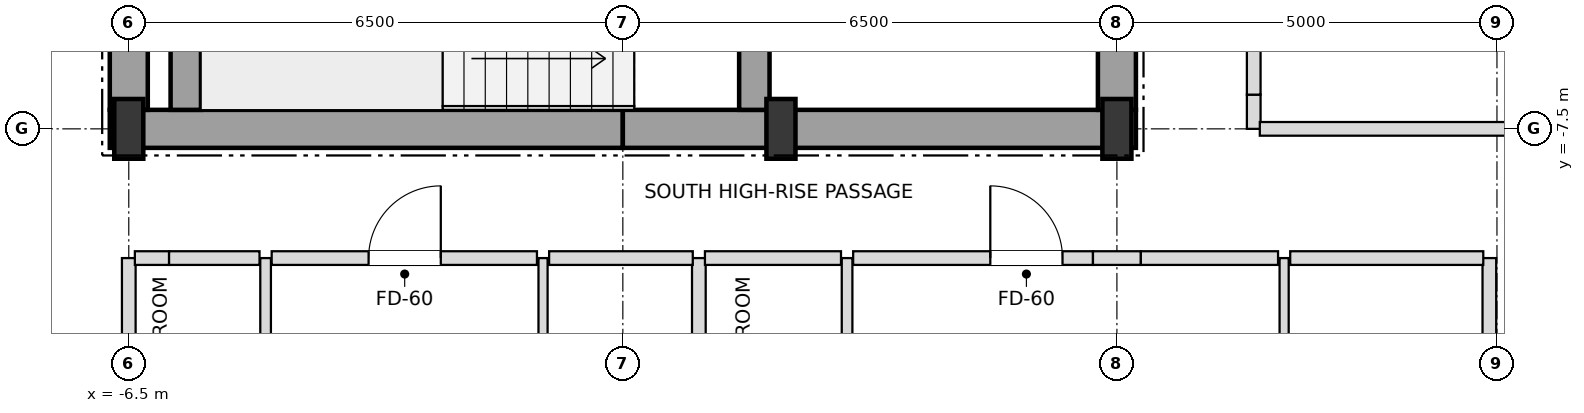
"""IFC4 building model, lengths in metres.
Left out: names, types, materials, properties, quantities, classifications, styles, units other than length and angle.
Written with IfcOpenShell. Run it as: python <this file> out.ifc"""

import sys

from ifc_helpers import new_model, si_unit, direction, frame, frame_2d, origin, origin_2d, place, context, subcontext, project, spatial, rectangle, i_section, extrude, element, fill, save


model = new_model("IFC4")
c1 = context("Model", 3, precision=1e-05, world=origin(), true_north=direction((0.0, 1.0)))
c2 = subcontext(c1, "Body", "Model", "MODEL_VIEW")
j1 = project(units=[si_unit("LENGTHUNIT", "METRE"), si_unit("PLANEANGLEUNIT", "RADIAN")], contexts=[c1])
p1 = place(None, origin())
s1 = spatial("IfcSite", under=j1, at=p1, CompositionType="ELEMENT")
p2 = place(p1, origin())
s2 = spatial("IfcBuilding", under=s1, at=p2, CompositionType="ELEMENT")
p3 = place(p2, frame((0.0, 0.0, 301.5)))
s3 = spatial("IfcBuildingStorey", under=s2, at=p3, CompositionType="ELEMENT", Elevation=301.5)
for number, where, z_axis, x_axis in (
    (1, (-6.5, -7.5, 0.0), (0.0, 0.0, 1.0), (1.0, 0.0, 0.0)),
    (2, (2.08, -7.5, 0.0), (0.0, 0.0, 1.0), (1.0, 0.0, 0.0)),
    (3, (6.5, -7.5, 0.0), (0.0, 0.0, 1.0), (1.0, 0.0, 0.0)),
):
    element("IfcColumn", number, at=place(p3, frame(where, z_axis=z_axis, x_axis=x_axis)), inside=s3, PredefinedType="COLUMN", context=c2, shape_type="SweptSolid", body=[
        extrude(i_section(OverallWidth=0.382, OverallDepth=0.786, WebThickness=0.02, FlangeThickness=0.033, at=origin_2d()), origin(), (0.0, 0.0, 1.0), 3.6),
    ])
for number, where, z_axis, x_axis in (
    (4, (-6.75, -7.5, 0.0), (0.0, 0.0, 1.0), (1.0, 0.0, 0.0)),
    (5, (0.0, -7.5, 0.0), (0.0, 0.0, 1.0), (1.0, 0.0, 0.0)),
):
    element("IfcWall", number, at=place(p3, frame(where, z_axis=z_axis, x_axis=x_axis)), inside=s3, PredefinedType="SHEAR", context=c2, shape_type="SweptSolid", body=[
        extrude(rectangle(XDim=6.75, YDim=0.5, at=frame_2d((3.375, 0.0))), origin(), (0.0, 0.0, 1.0), 3.3),
    ])
p4 = place(p3, frame((-6.5, -7.25, 0.0), z_axis=(0.0, 0.0, 1.0), x_axis=(0.0, 1.0, 0.0)))
e6 = element("IfcWall", 6, at=p4, inside=s3, PredefinedType="SHEAR", context=c2, shape_type="SweptSolid", body=[
    extrude(rectangle(XDim=3.55, YDim=0.5, at=frame_2d((1.775, 0.0))), origin(), (0.0, 0.0, 1.0), 3.3),
])
p5 = place(p3, frame((6.5, -7.25, 0.0), z_axis=(0.0, 0.0, 1.0), x_axis=(0.0, 1.0, 0.0)))
e7 = element("IfcWall", 7, at=p5, inside=s3, PredefinedType="SHEAR", context=c2, shape_type="SweptSolid", body=[
    extrude(rectangle(XDim=5.75, YDim=0.5, at=frame_2d((2.875, 0.0))), origin(), (0.0, 0.0, 1.0), 3.3),
])
p6 = place(p5, frame((0.85, 0.0, 0.0)))
e8 = element("IfcOpeningElement", 8, at=p6, cuts=e7, PredefinedType="OPENING", context=c2, shape_type="SweptSolid", body=[
    extrude(rectangle(XDim=1.05, YDim=2.15, at=frame_2d((0.525, 1.075))), frame((0.0, 0.26, 0.0), z_axis=(0.0, -1.0, 0.0), x_axis=(1.0, 0.0, 0.0)), (0.0, 0.0, 1.0), 0.52),
])
p7 = place(p3, frame((-5.75, -7.25, 0.0), z_axis=(0.0, 0.0, 1.0), x_axis=(0.0, 1.0, 0.0)))
e9 = element("IfcWall", 9, at=p7, inside=s3, PredefinedType="SHEAR", context=c2, shape_type="SweptSolid", body=[
    extrude(rectangle(XDim=2.9, YDim=0.4, at=frame_2d((1.45, 0.0))), origin(), (0.0, 0.0, 1.0), 3.3),
])
p8 = place(p3, frame((1.73, -7.25, 0.0), z_axis=(0.0, 0.0, 1.0), x_axis=(0.0, 1.0, 0.0)))
e10 = element("IfcWall", 10, at=p8, inside=s3, PredefinedType="SHEAR", context=c2, shape_type="SweptSolid", body=[
    extrude(rectangle(XDim=3.3, YDim=0.4, at=frame_2d((1.65, 0.0))), origin(), (0.0, 0.0, 1.0), 3.3),
])
p9 = place(p8, frame((0.9, 0.0, 0.0)))
e11 = element("IfcOpeningElement", 11, at=p9, cuts=e10, PredefinedType="OPENING", context=c2, shape_type="SweptSolid", body=[
    extrude(rectangle(XDim=1.05, YDim=2.15, at=frame_2d((0.525, 1.075))), frame((0.0, 0.21, 0.0), z_axis=(0.0, -1.0, 0.0), x_axis=(1.0, 0.0, 0.0)), (0.0, 0.0, 1.0), 0.42),
])
p10 = place(p3, frame((-6.5, -19.9, 0.0), z_axis=(0.0, 0.0, 1.0), x_axis=(0.0, 1.0, 0.0)))
e12 = element("IfcWall", 12, at=p10, inside=s3, PredefinedType="PARTITIONING", context=c2, shape_type="SweptSolid", body=[
    extrude(rectangle(XDim=10.7, YDim=0.18, at=frame_2d((5.35, 0.0))), origin(), (0.0, 0.0, 1.0), 1.485),
])
p11 = place(p3, frame((-4.7, -13.9, 0.0), z_axis=(0.0, 0.0, 1.0), x_axis=(0.0, 1.0, 0.0)))
e13 = element("IfcWall", 13, at=p11, inside=s3, PredefinedType="PARTITIONING", context=c2, shape_type="SweptSolid", body=[
    extrude(rectangle(XDim=4.7, YDim=0.14, at=frame_2d((2.35, 0.0))), origin(), (0.0, 0.0, 1.0), 3.3),
])
p12 = place(p11, frame((1.9, 0.0, 0.0)))
e14 = element("IfcOpeningElement", 14, at=p12, cuts=e13, PredefinedType="OPENING", context=c2, shape_type="SweptSolid", body=[
    extrude(rectangle(XDim=0.9, YDim=2.1, at=frame_2d((0.45, 1.05))), frame((0.0, 0.08, 0.0), z_axis=(0.0, -1.0, 0.0), x_axis=(1.0, 0.0, 0.0)), (0.0, 0.0, 1.0), 0.16),
])
p13 = place(p3, frame((-1.05, -13.9, 0.0), z_axis=(0.0, 0.0, 1.0), x_axis=(0.0, 1.0, 0.0)))
e15 = element("IfcWall", 15, at=p13, inside=s3, PredefinedType="PARTITIONING", context=c2, shape_type="SweptSolid", body=[
    extrude(rectangle(XDim=4.7, YDim=0.12, at=frame_2d((2.35, 0.0))), origin(), (0.0, 0.0, 1.0), 3.3),
])
p14 = place(p13, frame((1.875, 0.0, 0.0)))
e16 = element("IfcOpeningElement", 16, at=p14, cuts=e15, PredefinedType="OPENING", context=c2, shape_type="SweptSolid", body=[
    extrude(rectangle(XDim=0.95, YDim=2.1, at=frame_2d((0.475, 1.05))), frame((0.0, 0.07, 0.0), z_axis=(0.0, -1.0, 0.0), x_axis=(1.0, 0.0, 0.0)), (0.0, 0.0, 1.0), 0.14),
])
p15 = place(p3, frame((1.0, -19.9, 0.0), z_axis=(0.0, 0.0, 1.0), x_axis=(0.0, 1.0, 0.0)))
e17 = element("IfcWall", 17, at=p15, inside=s3, PredefinedType="PARTITIONING", context=c2, shape_type="SweptSolid", body=[
    extrude(rectangle(XDim=10.7, YDim=0.18, at=frame_2d((5.35, 0.0))), origin(), (0.0, 0.0, 1.0), 3.3),
])
p16 = place(p3, frame((2.95, -13.9, 0.0), z_axis=(0.0, 0.0, 1.0), x_axis=(0.0, 1.0, 0.0)))
e18 = element("IfcWall", 18, at=p16, inside=s3, PredefinedType="PARTITIONING", context=c2, shape_type="SweptSolid", body=[
    extrude(rectangle(XDim=4.7, YDim=0.14, at=frame_2d((2.35, 0.0))), origin(), (0.0, 0.0, 1.0), 3.3),
])
p17 = place(p16, frame((1.9, 0.0, 0.0)))
e19 = element("IfcOpeningElement", 19, at=p17, cuts=e18, PredefinedType="OPENING", context=c2, shape_type="SweptSolid", body=[
    extrude(rectangle(XDim=0.9, YDim=2.1, at=frame_2d((0.45, 1.05))), frame((0.0, 0.08, 0.0), z_axis=(0.0, -1.0, 0.0), x_axis=(1.0, 0.0, 0.0)), (0.0, 0.0, 1.0), 0.16),
])
p18 = place(p3, frame((8.3, -7.5, 0.0), z_axis=(0.0, 0.0, 1.0), x_axis=(0.0, 1.0, 0.0)))
e20 = element("IfcWall", 20, at=p18, inside=s3, PredefinedType="PARTITIONING", context=c2, shape_type="SweptSolid", body=[
    extrude(rectangle(XDim=0.45, YDim=0.18, at=frame_2d((0.225, 0.0))), origin(), (0.0, 0.0, 1.0), 1.485),
])
p19 = place(p3, frame((8.3, -7.05, 0.0), z_axis=(0.0, 0.0, 1.0), x_axis=(0.0, 1.0, 0.0)))
e21 = element("IfcWall", 21, at=p19, inside=s3, PredefinedType="PARTITIONING", context=c2, shape_type="SweptSolid", body=[
    extrude(rectangle(XDim=5.55, YDim=0.18, at=frame_2d((2.775, 0.0))), origin(), (0.0, 0.0, 1.0), 3.3),
])
p20 = place(p19, frame((0.975, 0.0, 0.0)))
e22 = element("IfcOpeningElement", 22, at=p20, cuts=e21, PredefinedType="OPENING", context=c2, shape_type="SweptSolid", body=[
    extrude(rectangle(XDim=0.95, YDim=2.15, at=frame_2d((0.475, 1.075))), frame((0.0, 0.1, 0.0), z_axis=(0.0, -1.0, 0.0), x_axis=(1.0, 0.0, 0.0)), (0.0, 0.0, 1.0), 0.2),
])
p21 = place(p3, frame((8.7, -19.9, 0.0), z_axis=(0.0, 0.0, 1.0), x_axis=(0.0, 1.0, 0.0)))
e23 = element("IfcWall", 23, at=p21, inside=s3, PredefinedType="PARTITIONING", context=c2, shape_type="SweptSolid", body=[
    extrude(rectangle(XDim=10.7, YDim=0.12, at=frame_2d((5.35, 0.0))), origin(), (0.0, 0.0, 1.0), 2.353),
])
p22 = place(p21, frame((7.875, 0.0, 0.0)))
e24 = element("IfcOpeningElement", 24, at=p22, cuts=e23, PredefinedType="OPENING", context=c2, shape_type="SweptSolid", body=[
    extrude(rectangle(XDim=0.95, YDim=2.1, at=frame_2d((0.475, 1.05))), frame((0.0, 0.07, 0.0), z_axis=(0.0, -1.0, 0.0), x_axis=(1.0, 0.0, 0.0)), (0.0, 0.0, 1.0), 0.14),
])
p23 = place(p21, frame((2.55, 0.0, 0.0)))
e25 = element("IfcOpeningElement", 25, at=p23, cuts=e23, PredefinedType="OPENING", context=c2, shape_type="SweptSolid", body=[
    extrude(rectangle(XDim=0.9, YDim=2.1, at=frame_2d((0.45, 1.05))), frame((0.0, 0.07, 0.0), z_axis=(0.0, -1.0, 0.0), x_axis=(1.0, 0.0, 0.0)), (0.0, 0.0, 1.0), 0.14),
])
p24 = place(p3, frame((11.4, -14.27, 0.0), z_axis=(0.0, 0.0, 1.0), x_axis=(0.0, 1.0, 0.0)))
e26 = element("IfcWall", 26, at=p24, inside=s3, PredefinedType="PARTITIONING", context=c2, shape_type="SweptSolid", body=[
    extrude(rectangle(XDim=5.07, YDim=0.18, at=frame_2d((2.535, 0.0))), origin(), (0.0, 0.0, 1.0), 2.353),
])
p25 = place(p3, frame((-6.42, -9.2, 0.0), z_axis=(0.0, 0.0, 1.0), x_axis=(1.0, 0.0, 0.0)))
e27 = element("IfcWall", 27, at=p25, inside=s3, PredefinedType="PARTITIONING", context=c2, shape_type="SweptSolid", body=[
    extrude(rectangle(XDim=0.45, YDim=0.18, at=frame_2d((0.225, 0.0))), origin(), (0.0, 0.0, 1.0), 1.485),
])
p26 = place(p3, frame((-5.97, -9.2, 0.0), z_axis=(0.0, 0.0, 1.0), x_axis=(1.0, 0.0, 0.0)))
e28 = element("IfcWall", 28, at=p26, inside=s3, PredefinedType="PARTITIONING", context=c2, shape_type="SweptSolid", body=[
    extrude(rectangle(XDim=1.19, YDim=0.18, at=frame_2d((0.595, 0.0))), origin(), (0.0, 0.0, 1.0), 3.3),
])
p27 = place(p3, frame((-4.62, -9.2, 0.0), z_axis=(0.0, 0.0, 1.0), x_axis=(1.0, 0.0, 0.0)))
e29 = element("IfcWall", 29, at=p27, inside=s3, PredefinedType="PARTITIONING", context=c2, shape_type="SweptSolid", body=[
    extrude(rectangle(XDim=3.49, YDim=0.18, at=frame_2d((1.745, 0.0))), origin(), (0.0, 0.0, 1.0), 3.3),
])
p28 = place(p27, frame((1.275, 0.0, 0.0)))
e30 = element("IfcOpeningElement", 30, at=p28, cuts=e29, PredefinedType="OPENING", context=c2, shape_type="SweptSolid", body=[
    extrude(rectangle(XDim=0.95, YDim=2.15, at=frame_2d((0.475, 1.075))), frame((0.0, 0.1, 0.0), z_axis=(0.0, -1.0, 0.0), x_axis=(1.0, 0.0, 0.0)), (0.0, 0.0, 1.0), 0.2),
])
p29 = place(p3, frame((-0.97, -9.2, 0.0), z_axis=(0.0, 0.0, 1.0), x_axis=(1.0, 0.0, 0.0)))
e31 = element("IfcWall", 31, at=p29, inside=s3, PredefinedType="PARTITIONING", context=c2, shape_type="SweptSolid", body=[
    extrude(rectangle(XDim=1.89, YDim=0.18, at=frame_2d((0.945, 0.0))), origin(), (0.0, 0.0, 1.0), 3.3),
])
p30 = place(p3, frame((1.08, -9.2, 0.0), z_axis=(0.0, 0.0, 1.0), x_axis=(1.0, 0.0, 0.0)))
e32 = element("IfcWall", 32, at=p30, inside=s3, PredefinedType="PARTITIONING", context=c2, shape_type="SweptSolid", body=[
    extrude(rectangle(XDim=1.79, YDim=0.18, at=frame_2d((0.895, 0.0))), origin(), (0.0, 0.0, 1.0), 3.3),
])
p31 = place(p3, frame((3.03, -9.2, 0.0), z_axis=(0.0, 0.0, 1.0), x_axis=(1.0, 0.0, 0.0)))
e33 = element("IfcWall", 33, at=p31, inside=s3, PredefinedType="PARTITIONING", context=c2, shape_type="SweptSolid", body=[
    extrude(rectangle(XDim=3.155, YDim=0.18, at=frame_2d((1.578, 0.0))), origin(), (0.0, 0.0, 1.0), 3.3),
])
p32 = place(p31, frame((1.804, 0.0, 0.0)))
e34 = element("IfcOpeningElement", 34, at=p32, cuts=e33, PredefinedType="OPENING", context=c2, shape_type="SweptSolid", body=[
    extrude(rectangle(XDim=0.95, YDim=2.15, at=frame_2d((0.475, 1.075))), frame((0.0, 0.1, 0.0), z_axis=(0.0, -1.0, 0.0), x_axis=(1.0, 0.0, 0.0)), (0.0, 0.0, 1.0), 0.2),
])
p33 = place(p3, frame((6.185, -9.2, 0.0), z_axis=(0.0, 0.0, 1.0), x_axis=(1.0, 0.0, 0.0)))
e35 = element("IfcWall", 35, at=p33, inside=s3, PredefinedType="PARTITIONING", context=c2, shape_type="SweptSolid", body=[
    extrude(rectangle(XDim=0.63, YDim=0.18, at=frame_2d((0.315, 0.0))), origin(), (0.0, 0.0, 1.0), 1.485),
])
p34 = place(p3, frame((6.815, -9.2, 0.0), z_axis=(0.0, 0.0, 1.0), x_axis=(1.0, 0.0, 0.0)))
e36 = element("IfcWall", 36, at=p34, inside=s3, PredefinedType="PARTITIONING", context=c2, shape_type="SweptSolid", body=[
    extrude(rectangle(XDim=1.805, YDim=0.18, at=frame_2d((0.903, 0.0))), origin(), (0.0, 0.0, 1.0), 3.3),
])
p35 = place(p3, frame((8.78, -9.2, 0.0), z_axis=(0.0, 0.0, 1.0), x_axis=(1.0, 0.0, 0.0)))
e37 = element("IfcWall", 37, at=p35, inside=s3, PredefinedType="PARTITIONING", context=c2, shape_type="SweptSolid", body=[
    extrude(rectangle(XDim=2.54, YDim=0.18, at=frame_2d((1.27, 0.0))), origin(), (0.0, 0.0, 1.0), 3.3),
])
p36 = place(p3, frame((8.38, -7.5, 0.0), z_axis=(0.0, 0.0, 1.0), x_axis=(1.0, 0.0, 0.0)))
e38 = element("IfcWall", 38, at=p36, inside=s3, PredefinedType="PARTITIONING", context=c2, shape_type="SweptSolid", body=[
    extrude(rectangle(XDim=8.52, YDim=0.18, at=frame_2d((4.26, 0.0))), origin(), (0.0, 0.0, 1.0), 1.485),
])
p37 = place(p28, origin())
e39 = element("IfcDoor", 39, at=p37, inside=s3, OperationType="SINGLE_SWING_RIGHT", PredefinedType="DOOR", context=c2, shape_type="SweptSolid", body=[
    extrude(rectangle(XDim=0.95, YDim=2.15, at=frame_2d((0.475, 1.075))), frame((0.0, 0.025, 0.0), z_axis=(0.0, -1.0, 0.0), x_axis=(1.0, 0.0, 0.0)), (0.0, 0.0, 1.0), 0.05),
])
fill(e30, e39)
p38 = place(p32, origin())
e40 = element("IfcDoor", 40, at=p38, inside=s3, OperationType="SINGLE_SWING_LEFT", PredefinedType="DOOR", context=c2, shape_type="SweptSolid", body=[
    extrude(rectangle(XDim=0.95, YDim=2.15, at=frame_2d((0.475, 1.075))), frame((0.0, 0.025, 0.0), z_axis=(0.0, -1.0, 0.0), x_axis=(1.0, 0.0, 0.0)), (0.0, 0.0, 1.0), 0.05),
])
fill(e34, e40)
save(model, sys.argv[1])
